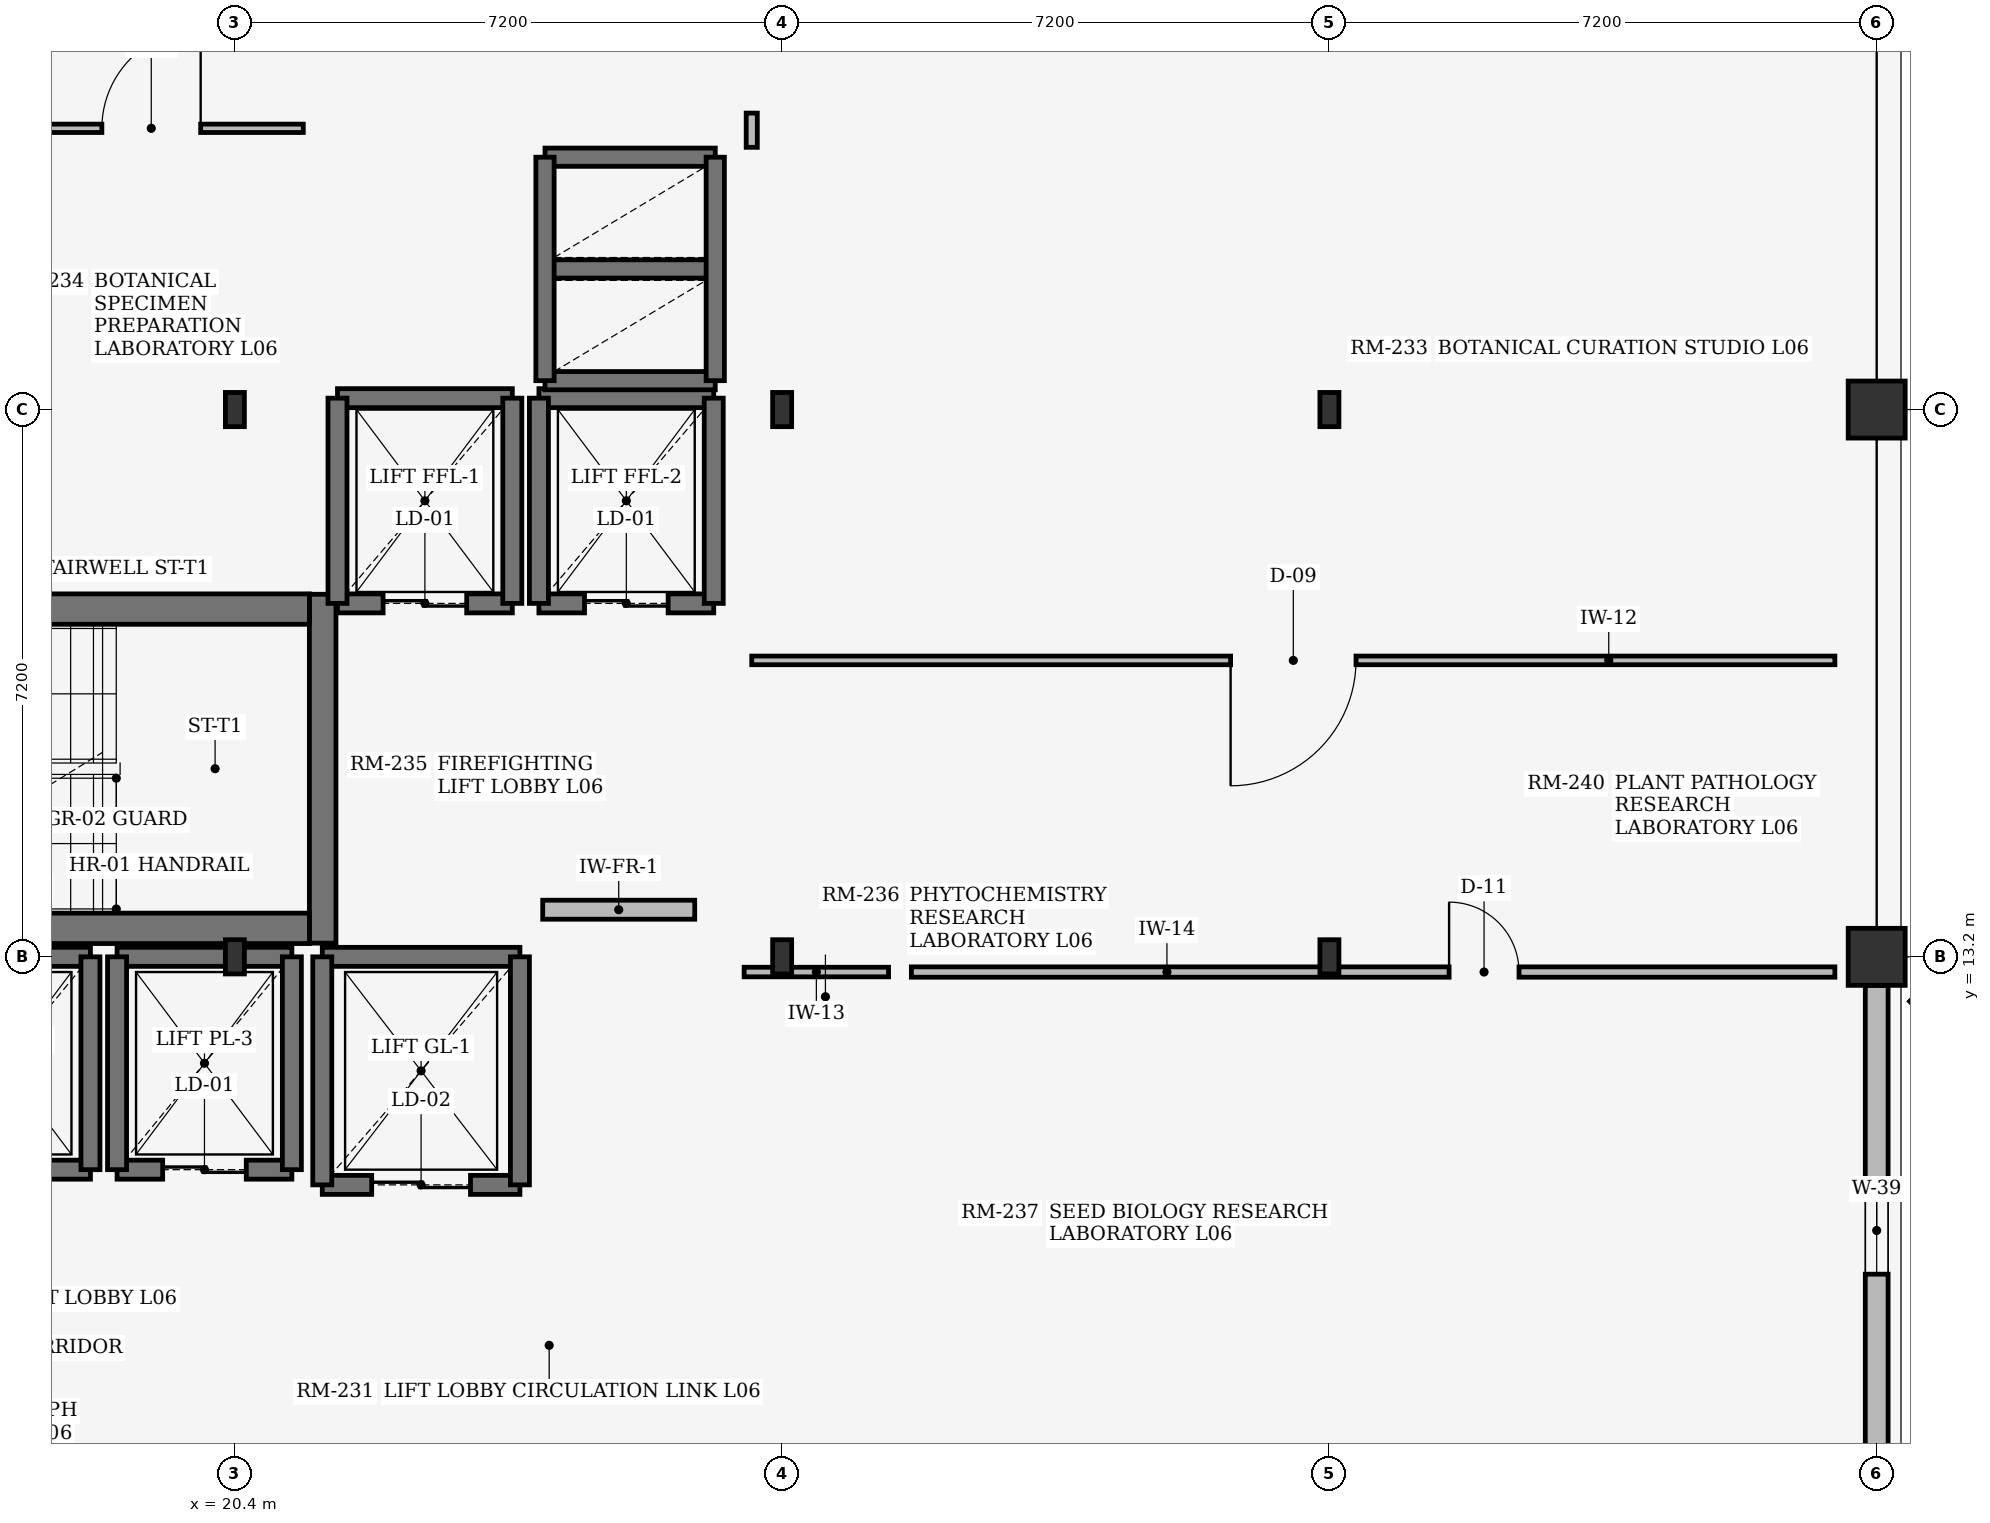
"""IFC4 building model, lengths in metres.
Left out: names, types, materials, properties, quantities, classifications, styles, units other than length and angle.
Written with IfcOpenShell. Run it as: python <this file> out.ifc"""

import sys

from ifc_helpers import new_model, si_unit, direction, frame, frame_2d, origin, origin_2d, place, context, subcontext, project, spatial, rectangle, i_section, extrude, element, fill, save


model = new_model("IFC4")
c1 = context("Model", 3, precision=1e-05, world=origin(), true_north=direction((0.0, 1.0)))
c2 = subcontext(c1, "Body", "Model", "MODEL_VIEW")
j1 = project(units=[si_unit("LENGTHUNIT", "METRE"), si_unit("PLANEANGLEUNIT", "RADIAN")], contexts=[c1])
p1 = place(None, origin())
s1 = spatial("IfcSite", under=j1, at=p1, CompositionType="ELEMENT")
p2 = place(p1, origin())
s2 = spatial("IfcBuilding", under=s1, at=p2, CompositionType="ELEMENT")
p3 = place(p2, frame((0.0, 0.0, 24.9)))
s3 = spatial("IfcBuildingStorey", under=s2, at=p3, CompositionType="ELEMENT", Elevation=24.9)
for number, where, z_axis, x_axis in (
    (1, (20.4, 13.2, 0.0), (0.0, 0.0, 1.0), (1.0, 0.0, 0.0)),
    (2, (20.4, 20.4, 0.0), (0.0, 0.0, 1.0), (1.0, 0.0, 0.0)),
    (3, (27.6, 13.2, 0.0), (0.0, 0.0, 1.0), (1.0, 0.0, 0.0)),
    (4, (27.6, 20.4, 0.0), (0.0, 0.0, 1.0), (1.0, 0.0, 0.0)),
    (5, (34.8, 13.2, 0.0), (0.0, 0.0, 1.0), (1.0, 0.0, 0.0)),
    (6, (34.8, 20.4, 0.0), (0.0, 0.0, 1.0), (1.0, 0.0, 0.0)),
):
    element("IfcColumn", number, at=place(p3, frame(where, z_axis=z_axis, x_axis=x_axis)), inside=s3, PredefinedType="COLUMN", context=c2, shape_type="SweptSolid", body=[
        extrude(i_section(OverallWidth=0.25, OverallDepth=0.45, WebThickness=0.011, FlangeThickness=0.014, at=origin_2d()), origin(), (0.0, 0.0, 1.0), 3.65),
    ])
for number, where, z_axis, x_axis in (
    (7, (42.0, 13.2, 0.0), (0.0, 0.0, 1.0), (1.0, 0.0, 0.0)),
    (8, (42.0, 20.4, 0.0), (0.0, 0.0, 1.0), (1.0, 0.0, 0.0)),
):
    element("IfcColumn", number, at=place(p3, frame(where, z_axis=z_axis, x_axis=x_axis)), inside=s3, PredefinedType="COLUMN", context=c2, shape_type="SweptSolid", body=[
        extrude(rectangle(XDim=0.75, YDim=0.75, at=origin_2d()), origin(), (0.0, 0.0, 1.0), 3.65),
    ])
p4 = place(p3, frame((42.0, 6.375, 0.0), z_axis=(0.0, 0.0, 1.0), x_axis=(0.0, 1.0, 0.0)))
e9 = element("IfcWall", 9, at=p4, inside=s3, PredefinedType="STANDARD", context=c2, shape_type="SweptSolid", body=[
    extrude(rectangle(XDim=6.45, YDim=0.3, at=frame_2d((3.225, 0.0))), origin(), (0.0, 0.0, 1.0), 3.13),
])
p5 = place(p4, frame((2.65, 0.0, 0.75)))
e10 = element("IfcOpeningElement", 10, at=p5, cuts=e9, PredefinedType="OPENING", context=c2, shape_type="SweptSolid", body=[
    extrude(rectangle(XDim=1.15, YDim=1.5, at=frame_2d((0.575, 0.75))), frame((0.0, 0.16, 0.0), z_axis=(0.0, -1.0, 0.0), x_axis=(1.0, 0.0, 0.0)), (0.0, 0.0, 1.0), 0.32),
])
p6 = place(p3, frame((21.555, 13.38, 0.0), z_axis=(0.0, 0.0, 1.0), x_axis=(0.0, 1.0, 0.0)))
e11 = element("IfcWall", 11, at=p6, inside=s3, PredefinedType="SHEAR", context=c2, shape_type="SweptSolid", body=[
    extrude(rectangle(XDim=4.59, YDim=0.35, at=frame_2d((2.295, 0.0))), origin(), (0.0, 0.0, 1.0), 3.65),
])
for number, where, z_axis, x_axis in (
    (12, (13.4, 13.575, 0.0), (0.0, 0.0, 1.0), (1.0, 0.0, 0.0)),
    (13, (13.4, 17.775, 0.0), (0.0, 0.0, 1.0), (1.0, 0.0, 0.0)),
):
    element("IfcWall", number, at=place(p3, frame(where, z_axis=z_axis, x_axis=x_axis)), inside=s3, PredefinedType="SHEAR", context=c2, shape_type="SweptSolid", body=[
        extrude(rectangle(XDim=7.98, YDim=0.4, at=frame_2d((3.99, 0.0))), origin(), (0.0, 0.0, 1.0), 3.65),
    ])
p7 = place(p3, frame((21.75, 17.85, 0.0), z_axis=(0.0, 0.0, 1.0), x_axis=(1.0, 0.0, 0.0)))
e14 = element("IfcWall", 14, at=p7, inside=s3, PredefinedType="SHEAR", context=c2, shape_type="SweptSolid", body=[
    extrude(rectangle(XDim=2.3, YDim=0.25, at=frame_2d((1.15, 0.0))), origin(), (0.0, 0.0, 1.0), 3.65),
])
p8 = place(p7, frame((0.6, 0.0, 0.0)))
e15 = element("IfcOpeningElement", 15, at=p8, cuts=e14, PredefinedType="OPENING", context=c2, shape_type="SweptSolid", body=[
    extrude(rectangle(XDim=1.1, YDim=2.2, at=frame_2d((0.55, 1.1))), frame((0.0, 0.135, 0.0), z_axis=(0.0, -1.0, 0.0), x_axis=(1.0, 0.0, 0.0)), (0.0, 0.0, 1.0), 0.27),
])
p9 = place(p3, frame((21.75, 20.55, 0.0), z_axis=(0.0, 0.0, 1.0), x_axis=(1.0, 0.0, 0.0)))
e16 = element("IfcWall", 16, at=p9, inside=s3, PredefinedType="SHEAR", context=c2, shape_type="SweptSolid", body=[
    extrude(rectangle(XDim=2.3, YDim=0.25, at=frame_2d((1.15, 0.0))), origin(), (0.0, 0.0, 1.0), 3.65),
])
for number, where, z_axis, x_axis in (
    (17, (21.75, 17.85, 0.0), (0.0, 0.0, 1.0), (0.0, 1.0, 0.0)),
    (18, (24.05, 17.85, 0.0), (0.0, 0.0, 1.0), (0.0, 1.0, 0.0)),
):
    element("IfcWall", number, at=place(p3, frame(where, z_axis=z_axis, x_axis=x_axis)), inside=s3, PredefinedType="SHEAR", context=c2, shape_type="SweptSolid", body=[
        extrude(rectangle(XDim=2.7, YDim=0.25, at=frame_2d((1.35, 0.0))), origin(), (0.0, 0.0, 1.0), 3.65),
    ])
p10 = place(p3, frame((24.4, 17.85, 0.0), z_axis=(0.0, 0.0, 1.0), x_axis=(1.0, 0.0, 0.0)))
e19 = element("IfcWall", 19, at=p10, inside=s3, PredefinedType="SHEAR", context=c2, shape_type="SweptSolid", body=[
    extrude(rectangle(XDim=2.3, YDim=0.25, at=frame_2d((1.15, 0.0))), origin(), (0.0, 0.0, 1.0), 3.65),
])
p11 = place(p10, frame((0.6, 0.0, 0.0)))
e20 = element("IfcOpeningElement", 20, at=p11, cuts=e19, PredefinedType="OPENING", context=c2, shape_type="SweptSolid", body=[
    extrude(rectangle(XDim=1.1, YDim=2.2, at=frame_2d((0.55, 1.1))), frame((0.0, 0.135, 0.0), z_axis=(0.0, -1.0, 0.0), x_axis=(1.0, 0.0, 0.0)), (0.0, 0.0, 1.0), 0.27),
])
p12 = place(p3, frame((24.4, 20.55, 0.0), z_axis=(0.0, 0.0, 1.0), x_axis=(1.0, 0.0, 0.0)))
e21 = element("IfcWall", 21, at=p12, inside=s3, PredefinedType="SHEAR", context=c2, shape_type="SweptSolid", body=[
    extrude(rectangle(XDim=2.3, YDim=0.25, at=frame_2d((1.15, 0.0))), origin(), (0.0, 0.0, 1.0), 3.65),
])
for number, where, z_axis, x_axis in (
    (22, (24.4, 17.85, 0.0), (0.0, 0.0, 1.0), (0.0, 1.0, 0.0)),
    (23, (26.7, 17.85, 0.0), (0.0, 0.0, 1.0), (0.0, 1.0, 0.0)),
):
    element("IfcWall", number, at=place(p3, frame(where, z_axis=z_axis, x_axis=x_axis)), inside=s3, PredefinedType="SHEAR", context=c2, shape_type="SweptSolid", body=[
        extrude(rectangle(XDim=2.7, YDim=0.25, at=frame_2d((1.35, 0.0))), origin(), (0.0, 0.0, 1.0), 3.65),
    ])
p13 = place(p3, frame((16.2, 10.4, 0.0), z_axis=(0.0, 0.0, 1.0), x_axis=(1.0, 0.0, 0.0)))
e24 = element("IfcWall", 24, at=p13, inside=s3, PredefinedType="SHEAR", context=c2, shape_type="SweptSolid", body=[
    extrude(rectangle(XDim=2.3, YDim=0.25, at=frame_2d((1.15, 0.0))), origin(), (0.0, 0.0, 1.0), 3.65),
])
p14 = place(p13, frame((0.6, 0.0, 0.0)))
e25 = element("IfcOpeningElement", 25, at=p14, cuts=e24, PredefinedType="OPENING", context=c2, shape_type="SweptSolid", body=[
    extrude(rectangle(XDim=1.1, YDim=2.2, at=frame_2d((0.55, 1.1))), frame((0.0, 0.135, 0.0), z_axis=(0.0, -1.0, 0.0), x_axis=(1.0, 0.0, 0.0)), (0.0, 0.0, 1.0), 0.27),
])
p15 = place(p3, frame((16.2, 13.2, 0.0), z_axis=(0.0, 0.0, 1.0), x_axis=(1.0, 0.0, 0.0)))
e26 = element("IfcWall", 26, at=p15, inside=s3, PredefinedType="SHEAR", context=c2, shape_type="SweptSolid", body=[
    extrude(rectangle(XDim=2.3, YDim=0.25, at=frame_2d((1.15, 0.0))), origin(), (0.0, 0.0, 1.0), 3.65),
])
p16 = place(p3, frame((18.5, 10.4, 0.0), z_axis=(0.0, 0.0, 1.0), x_axis=(0.0, 1.0, 0.0)))
e27 = element("IfcWall", 27, at=p16, inside=s3, PredefinedType="SHEAR", context=c2, shape_type="SweptSolid", body=[
    extrude(rectangle(XDim=2.8, YDim=0.25, at=frame_2d((1.4, 0.0))), origin(), (0.0, 0.0, 1.0), 3.65),
])
p17 = place(p3, frame((18.85, 10.4, 0.0), z_axis=(0.0, 0.0, 1.0), x_axis=(1.0, 0.0, 0.0)))
e28 = element("IfcWall", 28, at=p17, inside=s3, PredefinedType="SHEAR", context=c2, shape_type="SweptSolid", body=[
    extrude(rectangle(XDim=2.3, YDim=0.25, at=frame_2d((1.15, 0.0))), origin(), (0.0, 0.0, 1.0), 3.65),
])
p18 = place(p17, frame((0.6, 0.0, 0.0)))
e29 = element("IfcOpeningElement", 29, at=p18, cuts=e28, PredefinedType="OPENING", context=c2, shape_type="SweptSolid", body=[
    extrude(rectangle(XDim=1.1, YDim=2.2, at=frame_2d((0.55, 1.1))), frame((0.0, 0.135, 0.0), z_axis=(0.0, -1.0, 0.0), x_axis=(1.0, 0.0, 0.0)), (0.0, 0.0, 1.0), 0.27),
])
p19 = place(p3, frame((18.85, 13.2, 0.0), z_axis=(0.0, 0.0, 1.0), x_axis=(1.0, 0.0, 0.0)))
e30 = element("IfcWall", 30, at=p19, inside=s3, PredefinedType="SHEAR", context=c2, shape_type="SweptSolid", body=[
    extrude(rectangle(XDim=2.3, YDim=0.25, at=frame_2d((1.15, 0.0))), origin(), (0.0, 0.0, 1.0), 3.65),
])
for number, where, z_axis, x_axis in (
    (31, (18.85, 10.4, 0.0), (0.0, 0.0, 1.0), (0.0, 1.0, 0.0)),
    (32, (21.15, 10.4, 0.0), (0.0, 0.0, 1.0), (0.0, 1.0, 0.0)),
):
    element("IfcWall", number, at=place(p3, frame(where, z_axis=z_axis, x_axis=x_axis)), inside=s3, PredefinedType="SHEAR", context=c2, shape_type="SweptSolid", body=[
        extrude(rectangle(XDim=2.8, YDim=0.25, at=frame_2d((1.4, 0.0))), origin(), (0.0, 0.0, 1.0), 3.65),
    ])
p20 = place(p3, frame((21.55, 10.2, 0.0), z_axis=(0.0, 0.0, 1.0), x_axis=(1.0, 0.0, 0.0)))
e33 = element("IfcWall", 33, at=p20, inside=s3, PredefinedType="SHEAR", context=c2, shape_type="SweptSolid", body=[
    extrude(rectangle(XDim=2.6, YDim=0.25, at=frame_2d((1.3, 0.0))), origin(), (0.0, 0.0, 1.0), 3.65),
])
p21 = place(p20, frame((0.65, 0.0, 0.0)))
e34 = element("IfcOpeningElement", 34, at=p21, cuts=e33, PredefinedType="OPENING", context=c2, shape_type="SweptSolid", body=[
    extrude(rectangle(XDim=1.3, YDim=2.25, at=frame_2d((0.65, 1.125))), frame((0.0, 0.135, 0.0), z_axis=(0.0, -1.0, 0.0), x_axis=(1.0, 0.0, 0.0)), (0.0, 0.0, 1.0), 0.27),
])
p22 = place(p3, frame((21.55, 13.2, 0.0), z_axis=(0.0, 0.0, 1.0), x_axis=(1.0, 0.0, 0.0)))
e35 = element("IfcWall", 35, at=p22, inside=s3, PredefinedType="SHEAR", context=c2, shape_type="SweptSolid", body=[
    extrude(rectangle(XDim=2.6, YDim=0.25, at=frame_2d((1.3, 0.0))), origin(), (0.0, 0.0, 1.0), 3.65),
])
for number, where, z_axis, x_axis in (
    (36, (21.55, 10.2, 0.0), (0.0, 0.0, 1.0), (0.0, 1.0, 0.0)),
    (37, (24.15, 10.2, 0.0), (0.0, 0.0, 1.0), (0.0, 1.0, 0.0)),
):
    element("IfcWall", number, at=place(p3, frame(where, z_axis=z_axis, x_axis=x_axis)), inside=s3, PredefinedType="SHEAR", context=c2, shape_type="SweptSolid", body=[
        extrude(rectangle(XDim=3.0, YDim=0.25, at=frame_2d((1.5, 0.0))), origin(), (0.0, 0.0, 1.0), 3.65),
    ])
for number, where, z_axis, x_axis in (
    (38, (24.48, 20.78, 0.0), (0.0, 0.0, 1.0), (1.0, 0.0, 0.0)),
    (39, (24.48, 22.25, 0.0), (0.0, 0.0, 1.0), (1.0, 0.0, 0.0)),
    (40, (24.48, 23.72, 0.0), (0.0, 0.0, 1.0), (1.0, 0.0, 0.0)),
):
    element("IfcWall", number, at=place(p3, frame(where, z_axis=z_axis, x_axis=x_axis)), inside=s3, PredefinedType="SHEAR", context=c2, shape_type="SweptSolid", body=[
        extrude(rectangle(XDim=2.24, YDim=0.24, at=frame_2d((1.12, 0.0))), origin(), (0.0, 0.0, 1.0), 3.65),
    ])
for number, where, z_axis, x_axis in (
    (41, (24.48, 20.78, 0.0), (0.0, 0.0, 1.0), (0.0, 1.0, 0.0)),
    (42, (26.72, 20.78, 0.0), (0.0, 0.0, 1.0), (0.0, 1.0, 0.0)),
):
    element("IfcWall", number, at=place(p3, frame(where, z_axis=z_axis, x_axis=x_axis)), inside=s3, PredefinedType="SHEAR", context=c2, shape_type="SweptSolid", body=[
        extrude(rectangle(XDim=2.94, YDim=0.24, at=frame_2d((1.47, 0.0))), origin(), (0.0, 0.0, 1.0), 3.65),
    ])
p23 = place(p3, frame((24.45, 13.82, 0.0), z_axis=(0.0, 0.0, 1.0), x_axis=(1.0, 0.0, 0.0)))
e43 = element("IfcWall", 43, at=p23, inside=s3, PredefinedType="SOLIDWALL", context=c2, shape_type="SweptSolid", body=[
    extrude(rectangle(XDim=2.0, YDim=0.25, at=frame_2d((1.0, 0.0))), origin(), (0.0, 0.0, 1.0), 3.63),
])
p24 = place(p3, frame((17.3, 24.1, 0.0), z_axis=(0.0, 0.0, 1.0), x_axis=(1.0, 0.0, 0.0)))
e44 = element("IfcWall", 44, at=p24, inside=s3, PredefinedType="PARTITIONING", context=c2, shape_type="SweptSolid", body=[
    extrude(rectangle(XDim=4.0, YDim=0.11, at=frame_2d((2.0, 0.0))), origin(), (0.0, 0.0, 1.0), 3.63),
])
p25 = place(p24, frame((1.35, 0.0, 0.0)))
e45 = element("IfcOpeningElement", 45, at=p25, cuts=e44, PredefinedType="OPENING", context=c2, shape_type="SweptSolid", body=[
    extrude(rectangle(XDim=1.3, YDim=2.2, at=frame_2d((0.65, 1.1))), frame((0.0, 0.065, 0.0), z_axis=(0.0, -1.0, 0.0), x_axis=(1.0, 0.0, 0.0)), (0.0, 0.0, 1.0), 0.13),
])
p26 = place(p3, frame((27.2, 17.1, 0.0), z_axis=(0.0, 0.0, 1.0), x_axis=(1.0, 0.0, 0.0)))
e46 = element("IfcWall", 46, at=p26, inside=s3, PredefinedType="PARTITIONING", context=c2, shape_type="SweptSolid", body=[
    extrude(rectangle(XDim=14.25, YDim=0.114, at=frame_2d((7.125, 0.0))), origin(), (0.0, 0.0, 1.0), 3.63),
])
p27 = place(p26, frame((6.3, 0.0, 0.0)))
e47 = element("IfcOpeningElement", 47, at=p27, cuts=e46, PredefinedType="OPENING", context=c2, shape_type="SweptSolid", body=[
    extrude(rectangle(XDim=1.65, YDim=2.25, at=frame_2d((0.825, 1.125))), frame((0.0, 0.067, 0.0), z_axis=(0.0, -1.0, 0.0), x_axis=(1.0, 0.0, 0.0)), (0.0, 0.0, 1.0), 0.134),
])
p28 = place(p3, frame((27.1, 13.0, 0.0), z_axis=(0.0, 0.0, 1.0), x_axis=(1.0, 0.0, 0.0)))
e48 = element("IfcWall", 48, at=p28, inside=s3, PredefinedType="PARTITIONING", context=c2, shape_type="SweptSolid", body=[
    extrude(rectangle(XDim=1.9, YDim=0.126, at=frame_2d((0.95, 0.0))), origin(), (0.0, 0.0, 1.0), 3.63),
])
p29 = place(p3, frame((29.3, 13.0, 0.0), z_axis=(0.0, 0.0, 1.0), x_axis=(1.0, 0.0, 0.0)))
e49 = element("IfcWall", 49, at=p29, inside=s3, PredefinedType="PARTITIONING", context=c2, shape_type="SweptSolid", body=[
    extrude(rectangle(XDim=12.15, YDim=0.136, at=frame_2d((6.075, 0.0))), origin(), (0.0, 0.0, 1.0), 3.63),
])
p30 = place(p29, frame((7.074, 0.0, 0.0)))
e50 = element("IfcOpeningElement", 50, at=p30, cuts=e49, PredefinedType="OPENING", context=c2, shape_type="SweptSolid", body=[
    extrude(rectangle(XDim=0.92, YDim=2.1, at=frame_2d((0.46, 1.05))), frame((0.0, 0.078, 0.0), z_axis=(0.0, -1.0, 0.0), x_axis=(1.0, 0.0, 0.0)), (0.0, 0.0, 1.0), 0.156),
])
p31 = place(p3, frame((27.2, 24.3, 0.0), z_axis=(0.0, 0.0, 1.0), x_axis=(0.0, -1.0, 0.0)))
e51 = element("IfcWall", 51, at=p31, inside=s3, PredefinedType="PARTITIONING", context=c2, shape_type="SweptSolid", body=[
    extrude(rectangle(XDim=0.45, YDim=0.146, at=frame_2d((0.225, 0.0))), origin(), (0.0, 0.0, 1.0), 3.63),
])
p32 = place(p5, origin())
e52 = element("IfcWindow", 52, at=p32, inside=s3, PartitioningType="SINGLE_PANEL", PredefinedType="WINDOW", context=c2, shape_type="SweptSolid", body=[
    extrude(rectangle(XDim=1.15, YDim=1.5, at=frame_2d((0.575, 0.75))), frame((0.0, 0.03, 0.0), z_axis=(0.0, -1.0, 0.0), x_axis=(1.0, 0.0, 0.0)), (0.0, 0.0, 1.0), 0.06),
])
fill(e10, e52)
p33 = place(p8, origin())
e53 = element("IfcDoor", 53, at=p33, inside=s3, OperationType="DOUBLE_DOOR_SLIDING", PredefinedType="DOOR", context=c2, shape_type="SweptSolid", body=[
    extrude(rectangle(XDim=1.1, YDim=2.2, at=frame_2d((0.55, 1.1))), frame((0.0, 0.025, 0.0), z_axis=(0.0, -1.0, 0.0), x_axis=(1.0, 0.0, 0.0)), (0.0, 0.0, 1.0), 0.05),
])
fill(e15, e53)
p34 = place(p11, origin())
e54 = element("IfcDoor", 54, at=p34, inside=s3, OperationType="DOUBLE_DOOR_SLIDING", PredefinedType="DOOR", context=c2, shape_type="SweptSolid", body=[
    extrude(rectangle(XDim=1.1, YDim=2.2, at=frame_2d((0.55, 1.1))), frame((0.0, 0.025, 0.0), z_axis=(0.0, -1.0, 0.0), x_axis=(1.0, 0.0, 0.0)), (0.0, 0.0, 1.0), 0.05),
])
fill(e20, e54)
p35 = place(p18, origin())
e55 = element("IfcDoor", 55, at=p35, inside=s3, OperationType="DOUBLE_DOOR_SLIDING", PredefinedType="DOOR", context=c2, shape_type="SweptSolid", body=[
    extrude(rectangle(XDim=1.1, YDim=2.2, at=frame_2d((0.55, 1.1))), frame((0.0, 0.025, 0.0), z_axis=(0.0, -1.0, 0.0), x_axis=(1.0, 0.0, 0.0)), (0.0, 0.0, 1.0), 0.05),
])
fill(e29, e55)
p36 = place(p21, origin())
e56 = element("IfcDoor", 56, at=p36, inside=s3, OperationType="DOUBLE_DOOR_SLIDING", PredefinedType="DOOR", context=c2, shape_type="SweptSolid", body=[
    extrude(rectangle(XDim=1.3, YDim=2.25, at=frame_2d((0.65, 1.125))), frame((0.0, 0.025, 0.0), z_axis=(0.0, -1.0, 0.0), x_axis=(1.0, 0.0, 0.0)), (0.0, 0.0, 1.0), 0.05),
])
fill(e34, e56)
p37 = place(p25, frame((1.3, 0.0, 0.0), z_axis=(0.0, 0.0, 1.0), x_axis=(-1.0, 0.0, 0.0)))
e57 = element("IfcDoor", 57, at=p37, inside=s3, OperationType="SINGLE_SWING_RIGHT", PredefinedType="DOOR", context=c2, shape_type="SweptSolid", body=[
    extrude(rectangle(XDim=1.3, YDim=2.2, at=frame_2d((0.65, 1.1))), frame((0.0, 0.025, 0.0), z_axis=(0.0, -1.0, 0.0), x_axis=(1.0, 0.0, 0.0)), (0.0, 0.0, 1.0), 0.05),
])
fill(e45, e57)
p38 = place(p27, frame((1.65, 0.0, 0.0), z_axis=(0.0, 0.0, 1.0), x_axis=(-1.0, 0.0, 0.0)))
e58 = element("IfcDoor", 58, at=p38, inside=s3, OperationType="DOUBLE_DOOR_SINGLE_SWING", PredefinedType="DOOR", context=c2, shape_type="SweptSolid", body=[
    extrude(rectangle(XDim=1.65, YDim=2.25, at=frame_2d((0.825, 1.125))), frame((0.0, 0.025, 0.0), z_axis=(0.0, -1.0, 0.0), x_axis=(1.0, 0.0, 0.0)), (0.0, 0.0, 1.0), 0.05),
])
fill(e47, e58)
p39 = place(p30, origin())
e59 = element("IfcDoor", 59, at=p39, inside=s3, OperationType="SINGLE_SWING_LEFT", PredefinedType="DOOR", context=c2, shape_type="SweptSolid", body=[
    extrude(rectangle(XDim=0.92, YDim=2.1, at=frame_2d((0.46, 1.05))), frame((0.0, 0.025, 0.0), z_axis=(0.0, -1.0, 0.0), x_axis=(1.0, 0.0, 0.0)), (0.0, 0.0, 1.0), 0.05),
])
fill(e50, e59)
save(model, sys.argv[1])
